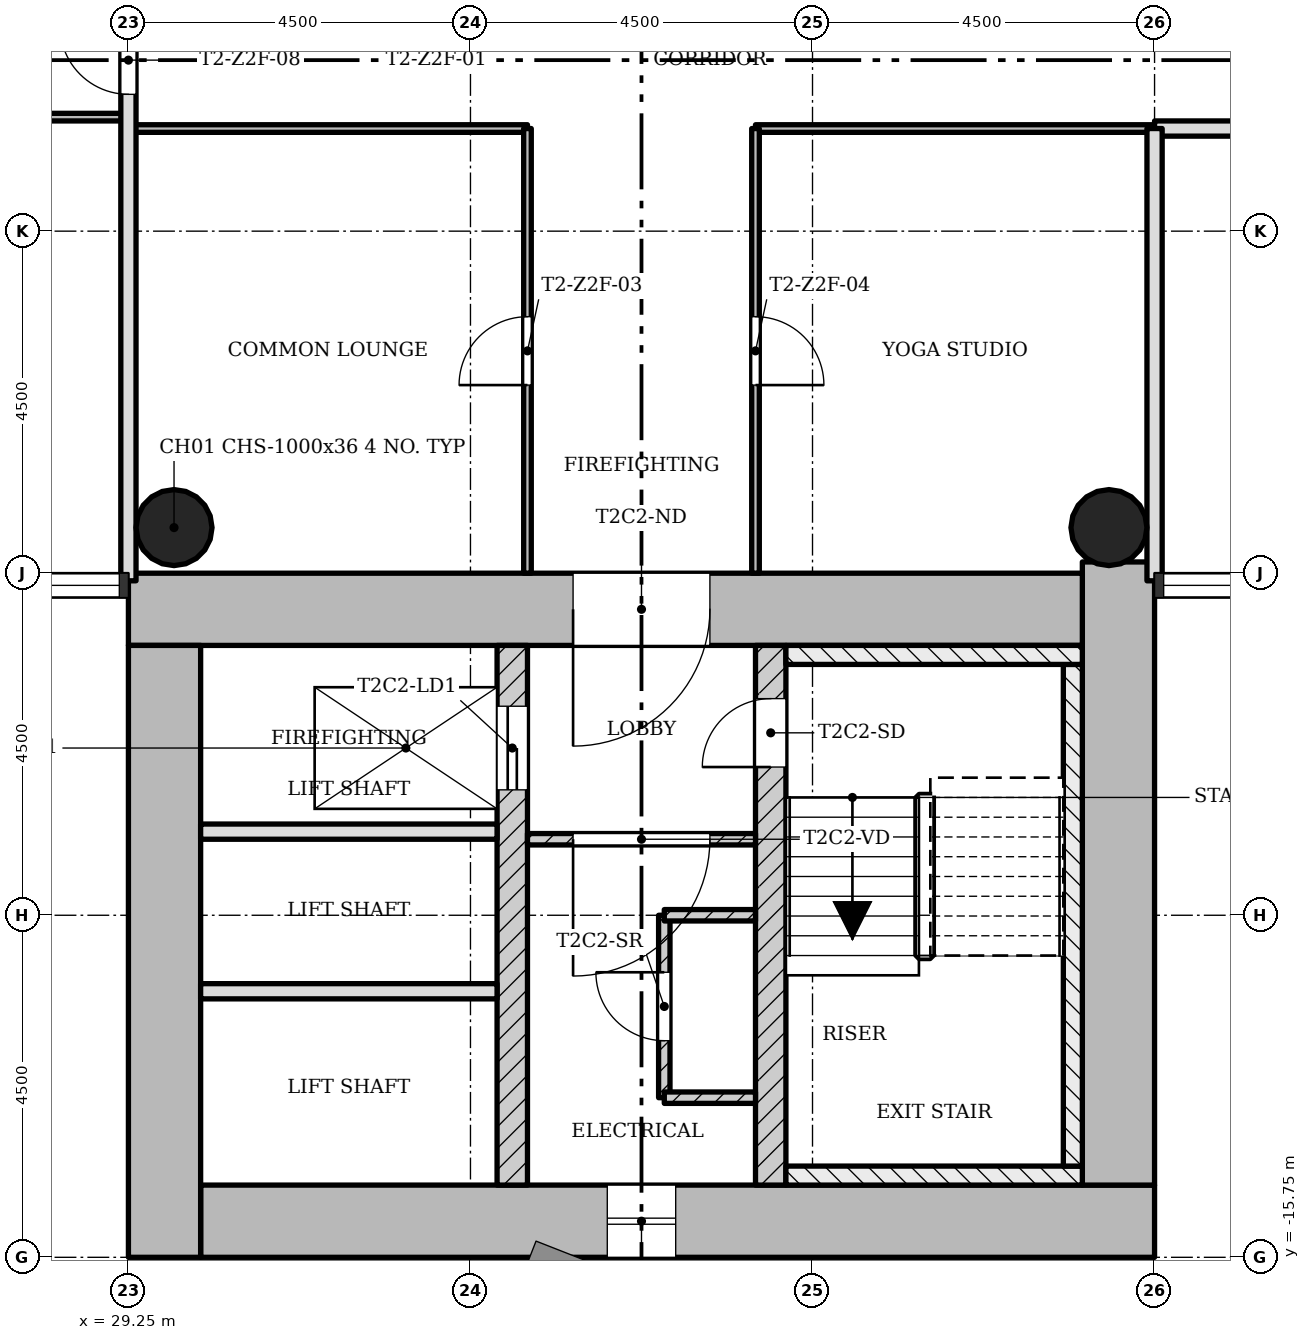
"""IFC4 building model, lengths in metres.
Left out: names, types, materials, properties, quantities, classifications, styles, units other than length and angle.
Written with IfcOpenShell. Run it as: python <this file> out.ifc"""

import sys

from ifc_helpers import new_model, si_unit, direction, frame, frame_2d, origin, origin_2d, place, context, subcontext, project, spatial, rectangle, hollow_circle, extrude, element, fill, save


model = new_model("IFC4")
c1 = context("Model", 3, precision=1e-05, world=origin(), true_north=direction((0.0, 1.0)))
c2 = subcontext(c1, "Body", "Model", "MODEL_VIEW")
j1 = project(units=[si_unit("LENGTHUNIT", "METRE"), si_unit("PLANEANGLEUNIT", "RADIAN")], contexts=[c1])
p1 = place(None, origin())
s1 = spatial("IfcSite", under=j1, at=p1, CompositionType="ELEMENT")
p2 = place(p1, origin())
s2 = spatial("IfcBuilding", under=s1, at=p2, CompositionType="ELEMENT")
p3 = place(p2, frame((0.0, 0.0, 107.2)))
s3 = spatial("IfcBuildingStorey", under=s2, at=p3, CompositionType="ELEMENT", Elevation=107.2)
p4 = place(p3, frame((30.2, -15.275, 0.0), z_axis=(0.0, 0.0, 1.0), x_axis=(1.0, 0.0, 0.0)))
e1 = element("IfcWall", 1, at=p4, inside=s3, PredefinedType="SHEAR", context=c2, shape_type="SweptSolid", body=[
    extrude(rectangle(XDim=12.55, YDim=0.95, at=frame_2d((6.275, 0.0))), origin(), (0.0, 0.0, 1.0), 3.4),
])
p5 = place(p4, frame((5.35, 0.0, 0.45)))
e2 = element("IfcOpeningElement", 2, at=p5, cuts=e1, PredefinedType="OPENING", context=c2, shape_type="SweptSolid", body=[
    extrude(rectangle(XDim=0.9, YDim=2.4, at=frame_2d((0.45, 1.2))), frame((0.0, 0.485, 0.0), z_axis=(0.0, -1.0, 0.0), x_axis=(1.0, 0.0, 0.0)), (0.0, 0.0, 1.0), 0.97),
])
p6 = place(p3, frame((42.275, -14.8, 0.0), z_axis=(0.0, 0.0, 1.0), x_axis=(0.0, 1.0, 0.0)))
e3 = element("IfcWall", 3, at=p6, inside=s3, PredefinedType="SHEAR", context=c2, shape_type="SweptSolid", body=[
    extrude(rectangle(XDim=8.198, YDim=0.95, at=frame_2d((4.099, 0.0))), origin(), (0.0, 0.0, 1.0), 3.4),
])
p7 = place(p3, frame((41.8, -7.225, 0.0), z_axis=(0.0, 0.0, 1.0), x_axis=(-1.0, 0.0, 0.0)))
e4 = element("IfcWall", 4, at=p7, inside=s3, PredefinedType="SHEAR", context=c2, shape_type="SweptSolid", body=[
    extrude(rectangle(XDim=12.55, YDim=0.95, at=frame_2d((6.275, 0.0))), origin(), (0.0, 0.0, 1.0), 3.4),
])
p8 = place(p7, frame((4.9, 0.0, 0.0)))
e5 = element("IfcOpeningElement", 5, at=p8, cuts=e4, PredefinedType="OPENING", context=c2, shape_type="SweptSolid", body=[
    extrude(rectangle(XDim=1.8, YDim=2.1, at=frame_2d((0.9, 1.05))), frame((0.0, 0.485, 0.0), z_axis=(0.0, -1.0, 0.0), x_axis=(1.0, 0.0, 0.0)), (0.0, 0.0, 1.0), 0.97),
])
p9 = place(p3, frame((29.725, -7.7, 0.0), z_axis=(0.0, 0.0, 1.0), x_axis=(0.0, -1.0, 0.0)))
e6 = element("IfcWall", 6, at=p9, inside=s3, PredefinedType="SHEAR", context=c2, shape_type="SweptSolid", body=[
    extrude(rectangle(XDim=8.05, YDim=0.95, at=frame_2d((4.025, 0.0))), origin(), (0.0, 0.0, 1.0), 3.4),
])
p10 = place(p3, frame((34.3, -14.8, 0.0), z_axis=(0.0, 0.0, 1.0), x_axis=(0.0, 1.0, 0.0)))
e7 = element("IfcWall", 7, at=p10, inside=s3, PredefinedType="SHEAR", context=c2, shape_type="SweptSolid", body=[
    extrude(rectangle(XDim=7.1, YDim=0.4, at=frame_2d((3.55, 0.0))), origin(), (0.0, 0.0, 1.0), 3.4),
])
p11 = place(p10, frame((5.2, 0.0, 0.0)))
e8 = element("IfcOpeningElement", 8, at=p11, cuts=e7, PredefinedType="OPENING", context=c2, shape_type="SweptSolid", body=[
    extrude(rectangle(XDim=1.1, YDim=2.1, at=frame_2d((0.55, 1.05))), frame((0.0, 0.21, 0.0), z_axis=(0.0, -1.0, 0.0), x_axis=(1.0, 0.0, 0.0)), (0.0, 0.0, 1.0), 0.42),
])
p12 = place(p3, frame((37.7, -14.8, 0.0), z_axis=(0.0, 0.0, 1.0), x_axis=(0.0, 1.0, 0.0)))
e9 = element("IfcWall", 9, at=p12, inside=s3, PredefinedType="SHEAR", context=c2, shape_type="SweptSolid", body=[
    extrude(rectangle(XDim=7.1, YDim=0.4, at=frame_2d((3.55, 0.0))), origin(), (0.0, 0.0, 1.0), 3.4),
])
p13 = place(p12, frame((5.5, 0.0, 0.0)))
e10 = element("IfcOpeningElement", 10, at=p13, cuts=e9, PredefinedType="OPENING", context=c2, shape_type="SweptSolid", body=[
    extrude(rectangle(XDim=0.9, YDim=2.1, at=frame_2d((0.45, 1.05))), frame((0.0, 0.21, 0.0), z_axis=(0.0, -1.0, 0.0), x_axis=(1.0, 0.0, 0.0)), (0.0, 0.0, 1.0), 0.42),
])
for number, where, z_axis, x_axis in (
    (11, (42.15, -6.15, 0.0), (0.0, 0.0, 1.0), (1.0, 0.0, 0.0)),
    (12, (29.85, -6.15, 0.0), (0.0, 0.0, 1.0), (1.0, 0.0, 0.0)),
):
    element("IfcColumn", number, at=place(p3, frame(where, z_axis=z_axis, x_axis=x_axis)), inside=s3, PredefinedType="COLUMN", context=c2, shape_type="SweptSolid", body=[
        extrude(hollow_circle(Radius=0.5, WallThickness=0.036, at=origin_2d()), origin(), (0.0, 0.0, 1.0), 3.4),
    ])
p14 = place(p3, frame((34.5, -10.25, 0.0), z_axis=(0.0, 0.0, 1.0), x_axis=(1.0, 0.0, 0.0)))
e13 = element("IfcWall", 13, at=p14, inside=s3, PredefinedType="PARTITIONING", context=c2, shape_type="SweptSolid", body=[
    extrude(rectangle(XDim=3.0, YDim=0.15, at=frame_2d((1.5, 0.0))), origin(), (0.0, 0.0, 1.0), 3.0),
])
p15 = place(p14, frame((0.6, 0.0, 0.0)))
e14 = element("IfcOpeningElement", 14, at=p15, cuts=e13, PredefinedType="OPENING", context=c2, shape_type="SweptSolid", body=[
    extrude(rectangle(XDim=1.8, YDim=2.1, at=frame_2d((0.9, 1.05))), frame((0.0, 0.085, 0.0), z_axis=(0.0, -1.0, 0.0), x_axis=(1.0, 0.0, 0.0)), (0.0, 0.0, 1.0), 0.17),
])
for number, where, z_axis, x_axis in (
    (15, (30.2, -10.15, 0.0), (0.0, 0.0, 1.0), (1.0, 0.0, 0.0)),
    (16, (30.2, -12.25, 0.0), (0.0, 0.0, 1.0), (1.0, 0.0, 0.0)),
):
    element("IfcWall", number, at=place(p3, frame(where, z_axis=z_axis, x_axis=x_axis)), inside=s3, PredefinedType="SOLIDWALL", context=c2, shape_type="SweptSolid", body=[
        extrude(rectangle(XDim=3.9, YDim=0.2, at=frame_2d((1.95, 0.0))), origin(), (0.0, 0.0, 1.0), 3.0),
    ])
p16 = place(p3, frame((36.3, -11.25, 0.0), z_axis=(0.0, 0.0, 1.0), x_axis=(0.0, -1.0, 0.0)))
e17 = element("IfcWall", 17, at=p16, inside=s3, PredefinedType="PARTITIONING", context=c2, shape_type="SweptSolid", body=[
    extrude(rectangle(XDim=2.4, YDim=0.15, at=frame_2d((1.2, 0.0))), origin(), (0.0, 0.0, 1.0), 3.0),
])
p17 = place(p16, frame((0.75, 0.0, 0.0)))
e18 = element("IfcOpeningElement", 18, at=p17, cuts=e17, PredefinedType="OPENING", context=c2, shape_type="SweptSolid", body=[
    extrude(rectangle(XDim=0.9, YDim=2.1, at=frame_2d((0.45, 1.05))), frame((0.0, 0.085, 0.0), z_axis=(0.0, -1.0, 0.0), x_axis=(1.0, 0.0, 0.0)), (0.0, 0.0, 1.0), 0.17),
])
for number, where, z_axis, x_axis in (
    (19, (36.3, -11.25, 0.0), (0.0, 0.0, 1.0), (1.0, 0.0, 0.0)),
    (20, (36.3, -13.65, 0.0), (0.0, 0.0, 1.0), (1.0, 0.0, 0.0)),
):
    element("IfcWall", number, at=place(p3, frame(where, z_axis=z_axis, x_axis=x_axis)), inside=s3, PredefinedType="PARTITIONING", context=c2, shape_type="SweptSolid", body=[
        extrude(rectangle(XDim=1.2, YDim=0.15, at=frame_2d((0.6, 0.0))), origin(), (0.0, 0.0, 1.0), 3.0),
    ])
for number, where, z_axis, x_axis in (
    (21, (42.75, -0.9, 0.0), (0.0, 0.0, 1.0), (-1.0, 0.0, 0.0)),
    (22, (34.5, -0.9, 0.0), (0.0, 0.0, 1.0), (-1.0, 0.0, 0.0)),
):
    element("IfcWall", number, at=place(p3, frame(where, z_axis=z_axis, x_axis=x_axis)), inside=s3, PredefinedType="PARTITIONING", context=c2, shape_type="SweptSolid", body=[
        extrude(rectangle(XDim=5.25, YDim=0.1, at=frame_2d((2.625, 0.0))), origin(), (0.0, 0.0, 1.0), 3.0),
    ])
p18 = place(p3, frame((44.55, -0.9, 0.0), z_axis=(0.0, 0.0, 1.0), x_axis=(-1.0, 0.0, 0.0)))
e23 = element("IfcWall", 23, at=p18, inside=s3, PredefinedType="SOLIDWALL", context=c2, shape_type="SweptSolid", body=[
    extrude(rectangle(XDim=1.8, YDim=0.2, at=frame_2d((0.9, 0.0))), origin(), (0.0, 0.0, 1.0), 3.0),
])
p19 = place(p3, frame((29.25, -0.75, 0.0), z_axis=(0.0, 0.0, 1.0), x_axis=(-1.0, 0.0, 0.0)))
e24 = element("IfcWall", 24, at=p19, inside=s3, PredefinedType="PARTITIONING", context=c2, shape_type="SweptSolid", body=[
    extrude(rectangle(XDim=4.5, YDim=0.1, at=frame_2d((2.25, 0.0))), origin(), (0.0, 0.0, 1.0), 3.0),
])
p20 = place(p19, frame((1.8, 0.0, 0.0)))
e25 = element("IfcOpeningElement", 25, at=p20, cuts=e24, PredefinedType="OPENING", context=c2, shape_type="SweptSolid", body=[
    extrude(rectangle(XDim=0.9, YDim=2.1, at=frame_2d((0.45, 1.05))), frame((0.0, 0.06, 0.0), z_axis=(0.0, -1.0, 0.0), x_axis=(1.0, 0.0, 0.0)), (0.0, 0.0, 1.0), 0.12),
])
p21 = place(p3, frame((42.75, -6.85, 0.0), z_axis=(0.0, 0.0, 1.0), x_axis=(0.0, 1.0, 0.0)))
e26 = element("IfcWall", 26, at=p21, inside=s3, PredefinedType="SOLIDWALL", context=c2, shape_type="SweptSolid", body=[
    extrude(rectangle(XDim=5.95, YDim=0.2, at=frame_2d((2.975, 0.0))), origin(), (0.0, 0.0, 1.0), 3.0),
])
p22 = place(p3, frame((37.5, -6.75, 0.0), z_axis=(0.0, 0.0, 1.0), x_axis=(0.0, 1.0, 0.0)))
e27 = element("IfcWall", 27, at=p22, inside=s3, PredefinedType="PARTITIONING", context=c2, shape_type="SweptSolid", body=[
    extrude(rectangle(XDim=5.85, YDim=0.1, at=frame_2d((2.925, 0.0))), origin(), (0.0, 0.0, 1.0), 3.0),
])
p23 = place(p22, frame((2.475, 0.0, 0.0)))
e28 = element("IfcOpeningElement", 28, at=p23, cuts=e27, PredefinedType="OPENING", context=c2, shape_type="SweptSolid", body=[
    extrude(rectangle(XDim=0.9, YDim=2.1, at=frame_2d((0.45, 1.05))), frame((0.0, 0.06, 0.0), z_axis=(0.0, -1.0, 0.0), x_axis=(1.0, 0.0, 0.0)), (0.0, 0.0, 1.0), 0.12),
])
p24 = place(p3, frame((34.5, -6.75, 0.0), z_axis=(0.0, 0.0, 1.0), x_axis=(0.0, 1.0, 0.0)))
e29 = element("IfcWall", 29, at=p24, inside=s3, PredefinedType="PARTITIONING", context=c2, shape_type="SweptSolid", body=[
    extrude(rectangle(XDim=5.85, YDim=0.1, at=frame_2d((2.925, 0.0))), origin(), (0.0, 0.0, 1.0), 3.0),
])
p25 = place(p24, frame((2.475, 0.0, 0.0)))
e30 = element("IfcOpeningElement", 30, at=p25, cuts=e29, PredefinedType="OPENING", context=c2, shape_type="SweptSolid", body=[
    extrude(rectangle(XDim=0.9, YDim=2.1, at=frame_2d((0.45, 1.05))), frame((0.0, 0.06, 0.0), z_axis=(0.0, -1.0, 0.0), x_axis=(1.0, 0.0, 0.0)), (0.0, 0.0, 1.0), 0.12),
])
p26 = place(p3, frame((29.25, -6.85, 0.0), z_axis=(0.0, 0.0, 1.0), x_axis=(0.0, 1.0, 0.0)))
e31 = element("IfcWall", 31, at=p26, inside=s3, PredefinedType="SOLIDWALL", context=c2, shape_type="SweptSolid", body=[
    extrude(rectangle(XDim=13.7, YDim=0.2, at=frame_2d((6.85, 0.0))), origin(), (0.0, 0.0, 1.0), 3.0),
])
p27 = place(p26, frame((6.4, 0.0, 0.0)))
e32 = element("IfcOpeningElement", 32, at=p27, cuts=e31, PredefinedType="OPENING", context=c2, shape_type="SweptSolid", body=[
    extrude(rectangle(XDim=0.9, YDim=2.1, at=frame_2d((0.45, 1.05))), frame((0.0, 0.11, 0.0), z_axis=(0.0, -1.0, 0.0), x_axis=(1.0, 0.0, 0.0)), (0.0, 0.0, 1.0), 0.22),
])
p28 = place(p3, frame((37.9, -14.675, 0.0), z_axis=(0.0, 0.0, 1.0), x_axis=(1.0, 0.0, 0.0)))
e33 = element("IfcWall", 33, at=p28, inside=s3, PredefinedType="SHEAR", context=c2, shape_type="SweptSolid", body=[
    extrude(rectangle(XDim=3.9, YDim=0.25, at=frame_2d((1.95, 0.0))), origin(), (0.0, 0.0, 1.0), 3.4),
])
p29 = place(p3, frame((41.675, -7.95, 0.0), z_axis=(0.0, 0.0, 1.0), x_axis=(0.0, -1.0, 0.0)))
e34 = element("IfcWall", 34, at=p29, inside=s3, PredefinedType="SHEAR", context=c2, shape_type="SweptSolid", body=[
    extrude(rectangle(XDim=6.6, YDim=0.25, at=frame_2d((3.3, 0.0))), origin(), (0.0, 0.0, 1.0), 3.4),
])
p30 = place(p3, frame((37.9, -7.825, 0.0), z_axis=(0.0, 0.0, 1.0), x_axis=(1.0, 0.0, 0.0)))
e35 = element("IfcWall", 35, at=p30, inside=s3, PredefinedType="SHEAR", context=c2, shape_type="SweptSolid", body=[
    extrude(rectangle(XDim=3.9, YDim=0.25, at=frame_2d((1.95, 0.0))), origin(), (0.0, 0.0, 1.0), 3.4),
])
p31 = place(p5, origin())
e36 = element("IfcWindow", 36, at=p31, inside=s3, PartitioningType="SINGLE_PANEL", PredefinedType="WINDOW", context=c2, shape_type="SweptSolid", body=[
    extrude(rectangle(XDim=0.9, YDim=2.4, at=frame_2d((0.45, 1.2))), frame((0.0, 0.03, 0.0), z_axis=(0.0, -1.0, 0.0), x_axis=(1.0, 0.0, 0.0)), (0.0, 0.0, 1.0), 0.06),
])
fill(e2, e36)
p32 = place(p15, origin())
e37 = element("IfcDoor", 37, at=p32, inside=s3, OperationType="SINGLE_SWING_LEFT", PredefinedType="DOOR", context=c2, shape_type="SweptSolid", body=[
    extrude(rectangle(XDim=1.8, YDim=2.1, at=frame_2d((0.9, 1.05))), frame((0.0, 0.025, 0.0), z_axis=(0.0, -1.0, 0.0), x_axis=(1.0, 0.0, 0.0)), (0.0, 0.0, 1.0), 0.05),
])
fill(e14, e37)
p33 = place(p17, origin())
e38 = element("IfcDoor", 38, at=p33, inside=s3, OperationType="SINGLE_SWING_LEFT", PredefinedType="DOOR", context=c2, shape_type="SweptSolid", body=[
    extrude(rectangle(XDim=0.9, YDim=2.1, at=frame_2d((0.45, 1.05))), frame((0.0, 0.025, 0.0), z_axis=(0.0, -1.0, 0.0), x_axis=(1.0, 0.0, 0.0)), (0.0, 0.0, 1.0), 0.05),
])
fill(e18, e38)
p34 = place(p25, origin())
e39 = element("IfcDoor", 39, at=p34, inside=s3, OperationType="SINGLE_SWING_RIGHT", PredefinedType="DOOR", context=c2, shape_type="SweptSolid", body=[
    extrude(rectangle(XDim=0.9, YDim=2.1, at=frame_2d((0.45, 1.05))), frame((0.0, 0.025, 0.0), z_axis=(0.0, -1.0, 0.0), x_axis=(1.0, 0.0, 0.0)), (0.0, 0.0, 1.0), 0.05),
])
fill(e30, e39)
p35 = place(p23, origin())
e40 = element("IfcDoor", 40, at=p35, inside=s3, OperationType="SINGLE_SWING_LEFT", PredefinedType="DOOR", context=c2, shape_type="SweptSolid", body=[
    extrude(rectangle(XDim=0.9, YDim=2.1, at=frame_2d((0.45, 1.05))), frame((0.0, 0.025, 0.0), z_axis=(0.0, -1.0, 0.0), x_axis=(1.0, 0.0, 0.0)), (0.0, 0.0, 1.0), 0.05),
])
fill(e28, e40)
p36 = place(p27, origin())
e41 = element("IfcDoor", 41, at=p36, inside=s3, OperationType="SINGLE_SWING_LEFT", PredefinedType="DOOR", context=c2, shape_type="SweptSolid", body=[
    extrude(rectangle(XDim=0.9, YDim=2.1, at=frame_2d((0.45, 1.05))), frame((0.0, 0.025, 0.0), z_axis=(0.0, -1.0, 0.0), x_axis=(1.0, 0.0, 0.0)), (0.0, 0.0, 1.0), 0.05),
])
fill(e32, e41)
p37 = place(p13, origin())
e42 = element("IfcDoor", 42, at=p37, inside=s3, OperationType="SINGLE_SWING_RIGHT", PredefinedType="DOOR", context=c2, shape_type="SweptSolid", body=[
    extrude(rectangle(XDim=0.9, YDim=2.1, at=frame_2d((0.45, 1.05))), frame((0.0, 0.025, 0.0), z_axis=(0.0, -1.0, 0.0), x_axis=(1.0, 0.0, 0.0)), (0.0, 0.0, 1.0), 0.05),
])
fill(e10, e42)
p38 = place(p11, origin())
e43 = element("IfcDoor", 43, at=p38, inside=s3, OperationType="SLIDING_TO_LEFT", PredefinedType="DOOR", context=c2, shape_type="SweptSolid", body=[
    extrude(rectangle(XDim=1.1, YDim=2.1, at=frame_2d((0.55, 1.05))), frame((0.0, 0.025, 0.0), z_axis=(0.0, -1.0, 0.0), x_axis=(1.0, 0.0, 0.0)), (0.0, 0.0, 1.0), 0.05),
])
fill(e8, e43)
p39 = place(p8, origin())
e44 = element("IfcDoor", 44, at=p39, inside=s3, OperationType="SINGLE_SWING_LEFT", PredefinedType="DOOR", context=c2, shape_type="SweptSolid", body=[
    extrude(rectangle(XDim=1.8, YDim=2.1, at=frame_2d((0.9, 1.05))), frame((0.0, 0.025, 0.0), z_axis=(0.0, -1.0, 0.0), x_axis=(1.0, 0.0, 0.0)), (0.0, 0.0, 1.0), 0.05),
])
fill(e5, e44)
save(model, sys.argv[1])
